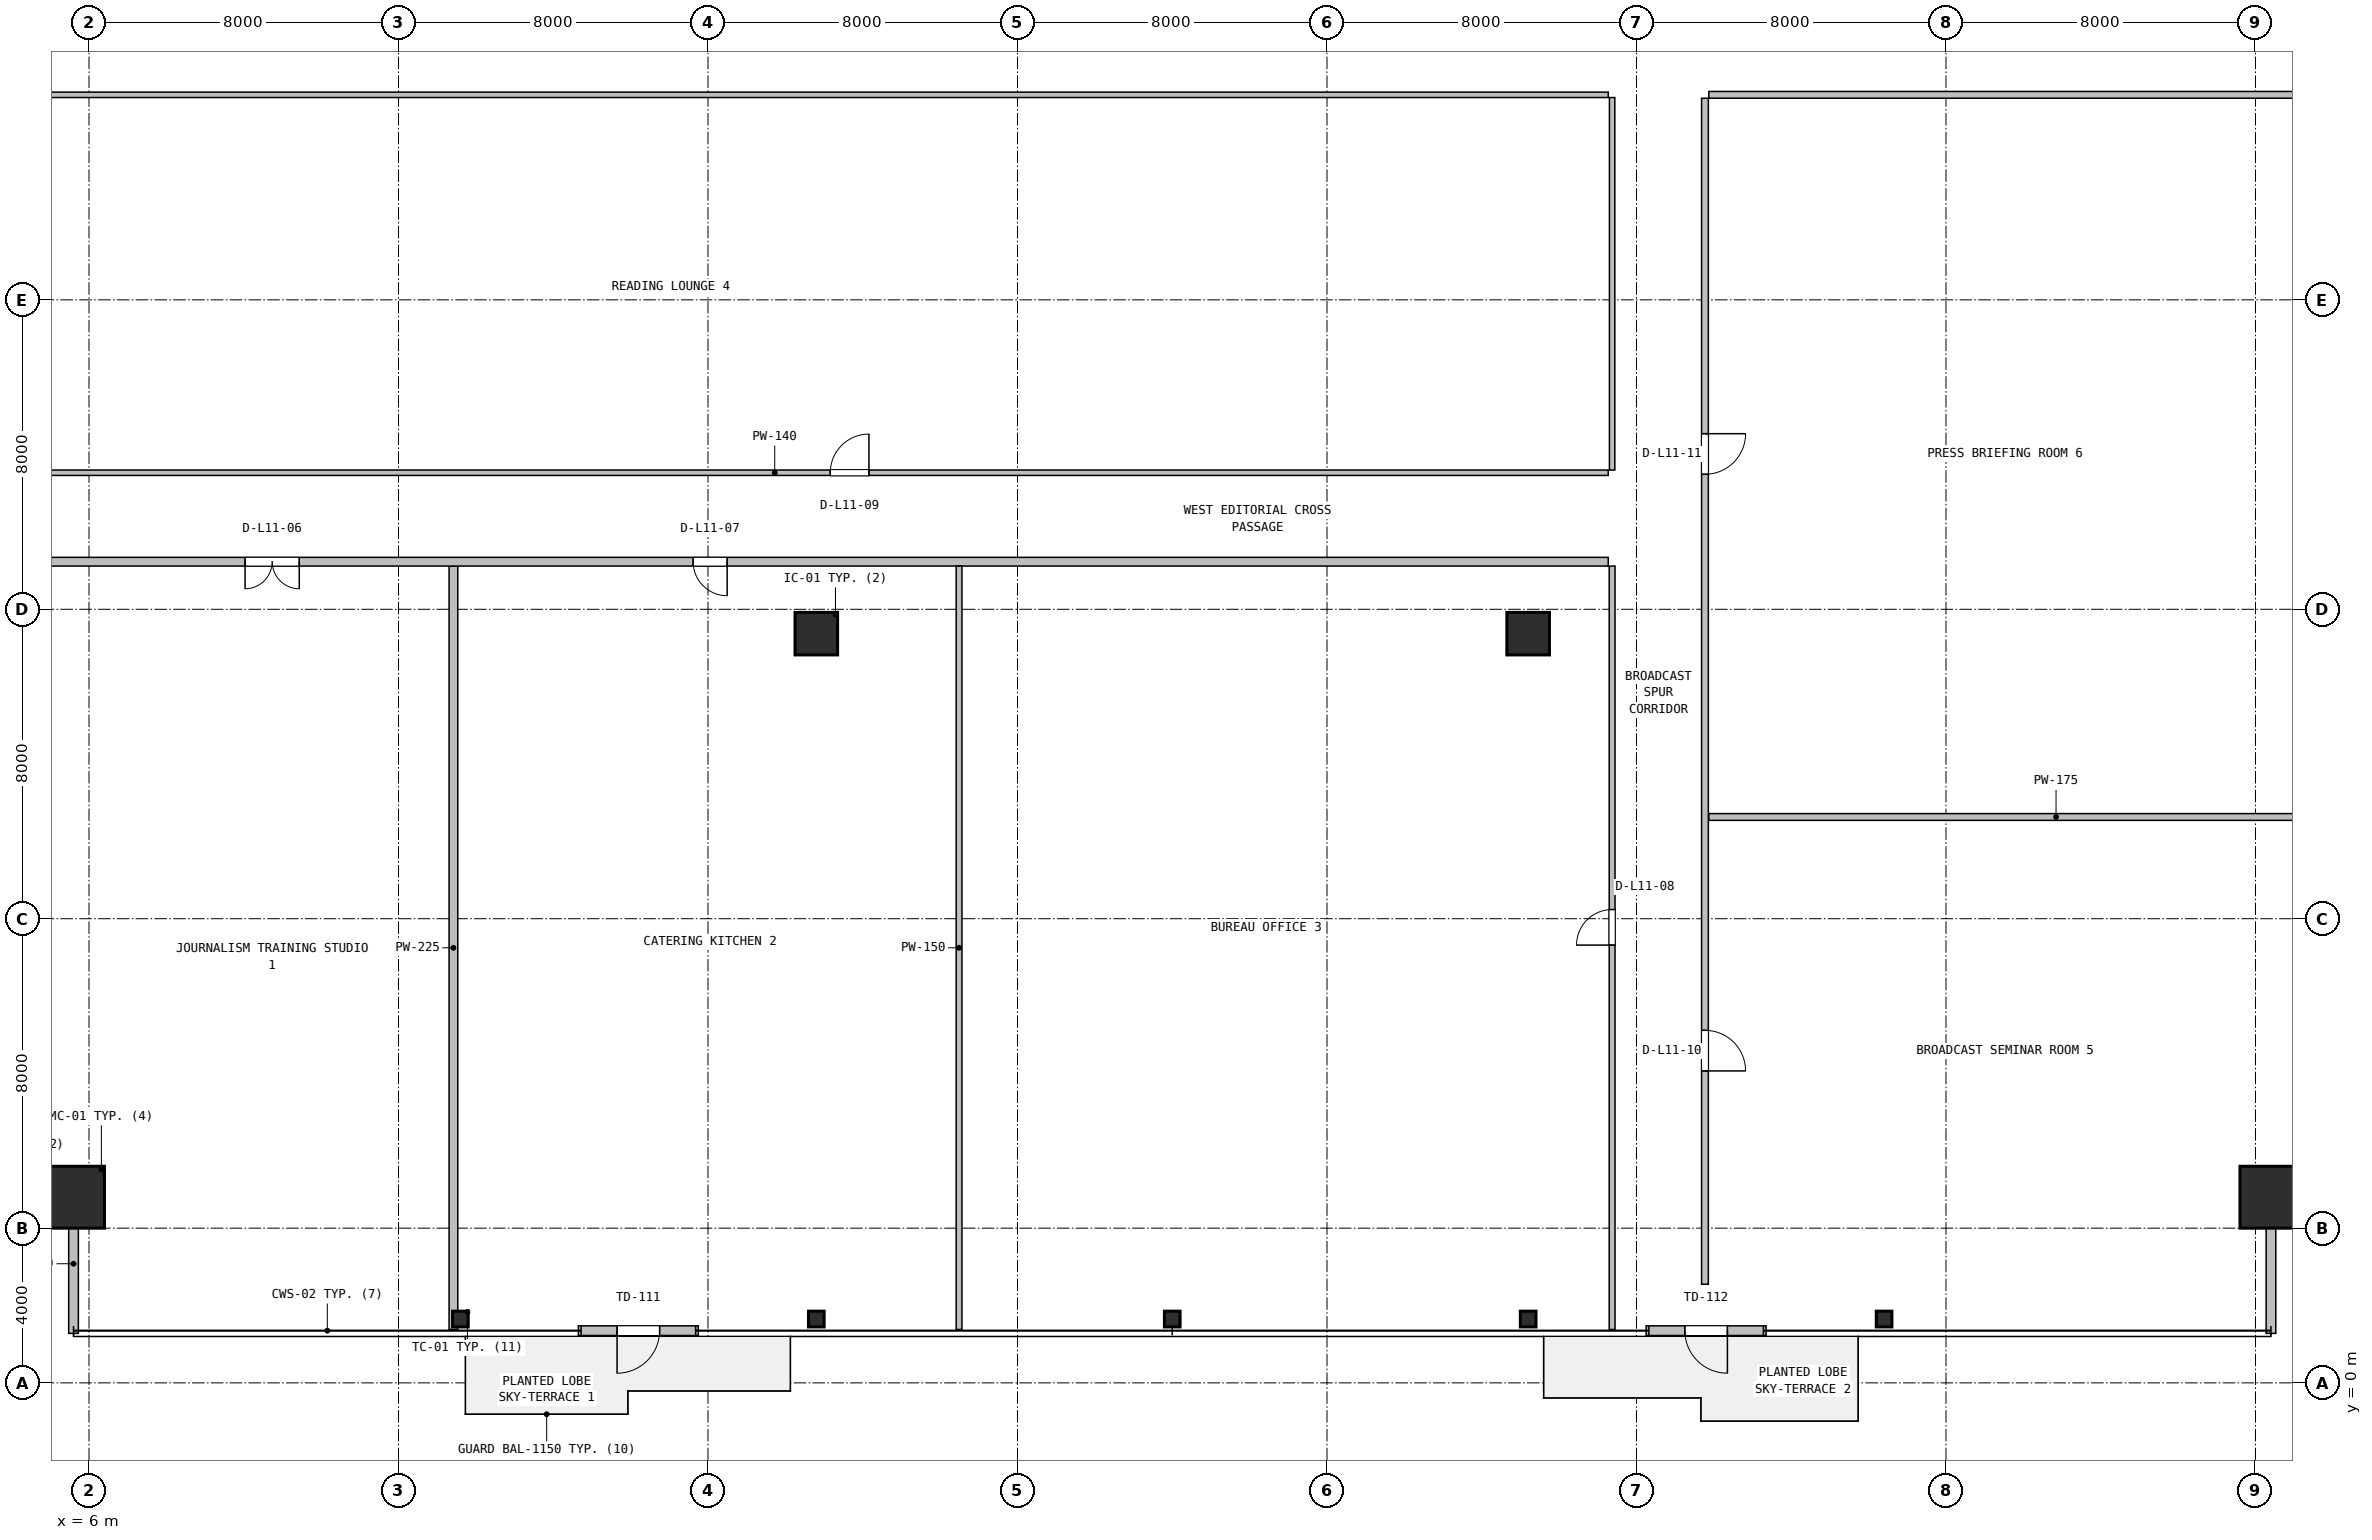
"""IFC4 building model, lengths in metres.
Left out: names, types, materials, properties, quantities, classifications, styles, units other than length and angle.
Written with IfcOpenShell. Run it as: python <this file> out.ifc"""

import sys

from ifc_helpers import new_model, si_unit, direction, frame, frame_2d, origin, origin_2d, place, context, subcontext, project, spatial, rectangle, hollow_rectangle, i_section, extrude, source, transform, mapped, element, fill, save


model = new_model("IFC4")
c1 = context("Model", 3, precision=1e-05, world=origin(), true_north=direction((0.0, 1.0)))
c2 = subcontext(c1, "Body", "Model", "MODEL_VIEW")
j1 = project(units=[si_unit("LENGTHUNIT", "METRE"), si_unit("PLANEANGLEUNIT", "RADIAN")], contexts=[c1])
p1 = place(None, origin())
s1 = spatial("IfcSite", under=j1, at=p1, CompositionType="ELEMENT")
p2 = place(p1, origin())
s2 = spatial("IfcBuilding", under=s1, at=p2, CompositionType="ELEMENT")
p3 = place(p2, frame((0.0, 0.0, 51.0)))
s3 = spatial("IfcBuildingStorey", under=s2, at=p3, CompositionType="ELEMENT", Elevation=51.0)
m1 = source(origin(), c2, "Body", "SweptSolid", [
    extrude(hollow_rectangle(XDim=1.6, YDim=1.6, WallThickness=0.06, at=origin_2d()), origin(), (0.0, 0.0, 1.0), 3.9),
])
for number, where, z_axis, x_axis in (
    (1, (5.6, 4.8, 0.0), (0.0, 0.0, 1.0), (1.0, 0.0, 0.0)),
    (2, (62.4, 4.8, 0.0), (0.0, 0.0, 1.0), (1.0, 0.0, 0.0)),
):
    element("IfcColumn", number, at=place(p3, frame(where, z_axis=z_axis, x_axis=x_axis)), inside=s3, PredefinedType="COLUMN", context=c2, shape_type="MappedRepresentation", body=[
        mapped(m1, transform((0.0, 0.0, 0.0), x_axis=(1.0, 0.0, 0.0), y_axis=(0.0, 1.0, 0.0), z_axis=(0.0, 0.0, 1.0), scale=1.0)),
    ])
m2 = source(origin(), c2, "Body", "SweptSolid", [
    extrude(i_section(OverallWidth=0.404, OverallDepth=0.407, WebThickness=0.027, FlangeThickness=0.044, FilletRadius=0.018, at=origin_2d()), origin(), (0.0, 0.0, 1.0), 3.9),
])
for number, where, z_axis, x_axis in (
    (3, (15.6, 1.65, 0.0), (0.0, 0.0, 1.0), (1.0, 0.0, 0.0)),
    (4, (24.8, 1.65, 0.0), (0.0, 0.0, 1.0), (1.0, 0.0, 0.0)),
    (5, (34.0, 1.65, 0.0), (0.0, 0.0, 1.0), (1.0, 0.0, 0.0)),
    (6, (43.2, 1.65, 0.0), (0.0, 0.0, 1.0), (1.0, 0.0, 0.0)),
    (7, (52.4, 1.65, 0.0), (0.0, 0.0, 1.0), (1.0, 0.0, 0.0)),
):
    element("IfcColumn", number, at=place(p3, frame(where, z_axis=z_axis, x_axis=x_axis)), inside=s3, PredefinedType="COLUMN", context=c2, shape_type="MappedRepresentation", body=[
        mapped(m2, transform((0.0, 0.0, 0.0), x_axis=(1.0, 0.0, 0.0), y_axis=(0.0, 1.0, 0.0), z_axis=(0.0, 0.0, 1.0), scale=1.0)),
    ])
m3 = source(origin(), c2, "Body", "SweptSolid", [
    extrude(rectangle(XDim=1.1, YDim=1.1, at=origin_2d()), origin(), (0.0, 0.0, 1.0), 3.9),
])
for number, where, z_axis, x_axis in (
    (8, (24.8, 19.37, 0.0), (0.0, 0.0, 1.0), (1.0, 0.0, 0.0)),
    (9, (43.2, 19.37, 0.0), (0.0, 0.0, 1.0), (1.0, 0.0, 0.0)),
):
    element("IfcColumn", number, at=place(p3, frame(where, z_axis=z_axis, x_axis=x_axis)), inside=s3, PredefinedType="COLUMN", context=c2, shape_type="MappedRepresentation", body=[
        mapped(m3, transform((0.0, 0.0, 0.0), x_axis=(1.0, 0.0, 0.0), y_axis=(0.0, 1.0, 0.0), z_axis=(0.0, 0.0, 1.0), scale=1.0)),
    ])
p4 = place(p3, frame((18.65, 1.35, 0.0), z_axis=(0.0, 0.0, 1.0), x_axis=(1.0, 0.0, 0.0)))
e10 = element("IfcWall", 10, at=p4, inside=s3, PredefinedType="SOLIDWALL", context=c2, shape_type="SweptSolid", body=[
    extrude(rectangle(XDim=3.1, YDim=0.25, at=frame_2d((1.55, 0.0))), origin(), (0.0, 0.0, 1.0), 3.63),
])
p5 = place(p4, frame((1.0, 0.0, 0.0)))
e11 = element("IfcOpeningElement", 11, at=p5, cuts=e10, PredefinedType="OPENING", context=c2, shape_type="SweptSolid", body=[
    extrude(rectangle(XDim=1.1, YDim=2.15, at=frame_2d((0.55, 1.075))), frame((0.0, 0.135, 0.0), z_axis=(0.0, -1.0, 0.0), x_axis=(1.0, 0.0, 0.0)), (0.0, 0.0, 1.0), 0.27),
])
p6 = place(p3, frame((46.25, 1.35, 0.0), z_axis=(0.0, 0.0, 1.0), x_axis=(1.0, 0.0, 0.0)))
e12 = element("IfcWall", 12, at=p6, inside=s3, PredefinedType="SOLIDWALL", context=c2, shape_type="SweptSolid", body=[
    extrude(rectangle(XDim=3.1, YDim=0.25, at=frame_2d((1.55, 0.0))), origin(), (0.0, 0.0, 1.0), 3.63),
])
p7 = place(p6, frame((1.0, 0.0, 0.0)))
e13 = element("IfcOpeningElement", 13, at=p7, cuts=e12, PredefinedType="OPENING", context=c2, shape_type="SweptSolid", body=[
    extrude(rectangle(XDim=1.1, YDim=2.15, at=frame_2d((0.55, 1.075))), frame((0.0, 0.135, 0.0), z_axis=(0.0, -1.0, 0.0), x_axis=(1.0, 0.0, 0.0)), (0.0, 0.0, 1.0), 0.27),
])
for number, where, z_axis, x_axis in (
    (14, (5.6, 1.28, 0.0), (0.0, 0.0, 1.0), (0.0, 1.0, 0.0)),
    (15, (62.4, 1.28, 0.0), (0.0, 0.0, 1.0), (0.0, 1.0, 0.0)),
):
    element("IfcWall", number, at=place(p3, frame(where, z_axis=z_axis, x_axis=x_axis)), inside=s3, PredefinedType="SOLIDWALL", context=c2, shape_type="SweptSolid", body=[
        extrude(rectangle(XDim=3.6, YDim=0.25, at=frame_2d((1.8, 0.0))), origin(), (0.0, 0.0, 1.0), 3.208),
    ])
p8 = place(p3, frame((15.42, 1.38, 0.0), z_axis=(0.0, 0.0, 1.0), x_axis=(0.0, 1.0, 0.0)))
e16 = element("IfcWall", 16, at=p8, inside=s3, PredefinedType="PARTITIONING", context=c2, shape_type="SweptSolid", body=[
    extrude(rectangle(XDim=19.737, YDim=0.225, at=frame_2d((9.869, 0.0))), origin(), (0.0, 0.0, 1.0), 3.208),
])
p9 = place(p3, frame((2.18, 21.23, 0.0), z_axis=(0.0, 0.0, 1.0), x_axis=(1.0, 0.0, 0.0)))
e17 = element("IfcWall", 17, at=p9, inside=s3, PredefinedType="PARTITIONING", context=c2, shape_type="SweptSolid", body=[
    extrude(rectangle(XDim=43.09, YDim=0.225, at=frame_2d((21.545, 0.0))), origin(), (0.0, 0.0, 1.0), 2.852),
])
p10 = place(p9, frame((7.855, 0.0, 0.0)))
e18 = element("IfcOpeningElement", 18, at=p10, cuts=e17, PredefinedType="OPENING", context=c2, shape_type="SweptSolid", body=[
    extrude(rectangle(XDim=1.4, YDim=2.12, at=frame_2d((0.7, 1.06))), frame((0.0, 0.123, 0.0), z_axis=(0.0, -1.0, 0.0), x_axis=(1.0, 0.0, 0.0)), (0.0, 0.0, 1.0), 0.245),
])
p11 = place(p9, frame((19.435, 0.0, 0.0)))
e19 = element("IfcOpeningElement", 19, at=p11, cuts=e17, PredefinedType="OPENING", context=c2, shape_type="SweptSolid", body=[
    extrude(rectangle(XDim=0.88, YDim=2.06, at=frame_2d((0.44, 1.03))), frame((0.0, 0.123, 0.0), z_axis=(0.0, -1.0, 0.0), x_axis=(1.0, 0.0, 0.0)), (0.0, 0.0, 1.0), 0.245),
])
p12 = place(p3, frame((28.49, 1.38, 0.0), z_axis=(0.0, 0.0, 1.0), x_axis=(0.0, 1.0, 0.0)))
e20 = element("IfcWall", 20, at=p12, inside=s3, PredefinedType="PARTITIONING", context=c2, shape_type="SweptSolid", body=[
    extrude(rectangle(XDim=19.737, YDim=0.15, at=frame_2d((9.869, 0.0))), origin(), (0.0, 0.0, 1.0), 2.852),
])
p13 = place(p3, frame((45.37, 1.38, 0.0), z_axis=(0.0, 0.0, 1.0), x_axis=(0.0, 1.0, 0.0)))
e21 = element("IfcWall", 21, at=p13, inside=s3, PredefinedType="PARTITIONING", context=c2, shape_type="SweptSolid", body=[
    extrude(rectangle(XDim=19.737, YDim=0.15, at=frame_2d((9.869, 0.0))), origin(), (0.0, 0.0, 1.0), 3.208),
])
p14 = place(p13, frame((9.938, 0.0, 0.0)))
e22 = element("IfcOpeningElement", 22, at=p14, cuts=e21, PredefinedType="OPENING", context=c2, shape_type="SweptSolid", body=[
    extrude(rectangle(XDim=0.92, YDim=2.08, at=frame_2d((0.46, 1.04))), frame((0.0, 0.085, 0.0), z_axis=(0.0, -1.0, 0.0), x_axis=(1.0, 0.0, 0.0)), (0.0, 0.0, 1.0), 0.17),
])
p15 = place(p3, frame((2.18, 23.53, 0.0), z_axis=(0.0, 0.0, 1.0), x_axis=(1.0, 0.0, 0.0)))
e23 = element("IfcWall", 23, at=p15, inside=s3, PredefinedType="PARTITIONING", context=c2, shape_type="SweptSolid", body=[
    extrude(rectangle(XDim=43.09, YDim=0.14, at=frame_2d((21.545, 0.0))), origin(), (0.0, 0.0, 1.0), 2.852),
])
p16 = place(p15, frame((22.98, 0.0, 0.0)))
e24 = element("IfcOpeningElement", 24, at=p16, cuts=e23, PredefinedType="OPENING", context=c2, shape_type="SweptSolid", body=[
    extrude(rectangle(XDim=1.0, YDim=2.1, at=frame_2d((0.5, 1.05))), frame((0.0, 0.08, 0.0), z_axis=(0.0, -1.0, 0.0), x_axis=(1.0, 0.0, 0.0)), (0.0, 0.0, 1.0), 0.16),
])
p17 = place(p3, frame((45.37, 23.6, 0.0), z_axis=(0.0, 0.0, 1.0), x_axis=(0.0, 1.0, 0.0)))
e25 = element("IfcWall", 25, at=p17, inside=s3, PredefinedType="PARTITIONING", context=c2, shape_type="SweptSolid", body=[
    extrude(rectangle(XDim=9.63, YDim=0.14, at=frame_2d((4.815, 0.0))), origin(), (0.0, 0.0, 1.0), 3.378),
])
p18 = place(p3, frame((2.18, 33.3, 0.0), z_axis=(0.0, 0.0, 1.0), x_axis=(1.0, 0.0, 0.0)))
e26 = element("IfcWall", 26, at=p18, inside=s3, PredefinedType="PARTITIONING", context=c2, shape_type="SweptSolid", body=[
    extrude(rectangle(XDim=43.09, YDim=0.14, at=frame_2d((21.545, 0.0))), origin(), (0.0, 0.0, 1.0), 2.852),
])
p19 = place(p3, frame((47.87, 14.63, 0.0), z_axis=(0.0, 0.0, 1.0), x_axis=(1.0, 0.0, 0.0)))
e27 = element("IfcWall", 27, at=p19, inside=s3, PredefinedType="PARTITIONING", context=c2, shape_type="SweptSolid", body=[
    extrude(rectangle(XDim=17.95, YDim=0.175, at=frame_2d((8.975, 0.0))), origin(), (0.0, 0.0, 1.0), 3.208),
])
p20 = place(p3, frame((47.77, 2.55, 0.0), z_axis=(0.0, 0.0, 1.0), x_axis=(0.0, 1.0, 0.0)))
e28 = element("IfcWall", 28, at=p20, inside=s3, PredefinedType="PARTITIONING", context=c2, shape_type="SweptSolid", body=[
    extrude(rectangle(XDim=30.662, YDim=0.175, at=frame_2d((15.331, 0.0))), origin(), (0.0, 0.0, 1.0), 3.322),
])
p21 = place(p20, frame((5.515, 0.0, 0.0)))
e29 = element("IfcOpeningElement", 29, at=p21, cuts=e28, PredefinedType="OPENING", context=c2, shape_type="SweptSolid", body=[
    extrude(rectangle(XDim=1.05, YDim=2.1, at=frame_2d((0.525, 1.05))), frame((0.0, 0.098, 0.0), z_axis=(0.0, -1.0, 0.0), x_axis=(1.0, 0.0, 0.0)), (0.0, 0.0, 1.0), 0.195),
])
p22 = place(p20, frame((20.94, 0.0, 0.0)))
e30 = element("IfcOpeningElement", 30, at=p22, cuts=e28, PredefinedType="OPENING", context=c2, shape_type="SweptSolid", body=[
    extrude(rectangle(XDim=1.05, YDim=2.1, at=frame_2d((0.525, 1.05))), frame((0.0, 0.098, 0.0), z_axis=(0.0, -1.0, 0.0), x_axis=(1.0, 0.0, 0.0)), (0.0, 0.0, 1.0), 0.195),
])
p23 = place(p3, frame((47.87, 33.3, 0.0), z_axis=(0.0, 0.0, 1.0), x_axis=(1.0, 0.0, 0.0)))
e31 = element("IfcWall", 31, at=p23, inside=s3, PredefinedType="PARTITIONING", context=c2, shape_type="SweptSolid", body=[
    extrude(rectangle(XDim=17.95, YDim=0.175, at=frame_2d((8.975, 0.0))), origin(), (0.0, 0.0, 1.0), 3.208),
])
m4 = source(origin(), c2, "Body", "SweptSolid", [
    extrude(rectangle(XDim=1.1, YDim=2.15, at=frame_2d((0.55, 1.075))), frame((0.0, 0.025, 0.0), z_axis=(0.0, -1.0, 0.0), x_axis=(1.0, 0.0, 0.0)), (0.0, 0.0, 1.0), 0.05),
])
p24 = place(p5, frame((1.1, 0.0, 0.0), z_axis=(0.0, 0.0, 1.0), x_axis=(-1.0, 0.0, 0.0)))
e32 = element("IfcDoor", 32, at=p24, inside=s3, OperationType="SINGLE_SWING_LEFT", PredefinedType="DOOR", context=c2, shape_type="MappedRepresentation", body=[
    mapped(m4, transform((0.0, 0.0, 0.0), x_axis=(1.0, 0.0, 0.0), y_axis=(0.0, 1.0, 0.0), z_axis=(0.0, 0.0, 1.0), scale=1.0)),
])
fill(e11, e32)
p25 = place(p7, frame((1.1, 0.0, 0.0), z_axis=(0.0, 0.0, 1.0), x_axis=(-1.0, 0.0, 0.0)))
e33 = element("IfcDoor", 33, at=p25, inside=s3, OperationType="SINGLE_SWING_RIGHT", PredefinedType="DOOR", context=c2, shape_type="MappedRepresentation", body=[
    mapped(m4, transform((0.0, 0.0, 0.0), x_axis=(1.0, 0.0, 0.0), y_axis=(0.0, 1.0, 0.0), z_axis=(0.0, 0.0, 1.0), scale=1.0)),
])
fill(e13, e33)
m5 = source(origin(), c2, "Body", "SweptSolid", [
    extrude(rectangle(XDim=1.4, YDim=2.12, at=frame_2d((0.7, 1.06))), frame((0.0, 0.025, 0.0), z_axis=(0.0, -1.0, 0.0), x_axis=(1.0, 0.0, 0.0)), (0.0, 0.0, 1.0), 0.05),
])
p26 = place(p10, frame((1.4, 0.0, 0.0), z_axis=(0.0, 0.0, 1.0), x_axis=(-1.0, 0.0, 0.0)))
e34 = element("IfcDoor", 34, at=p26, inside=s3, OperationType="DOUBLE_DOOR_SINGLE_SWING", PredefinedType="DOOR", context=c2, shape_type="MappedRepresentation", body=[
    mapped(m5, transform((0.0, 0.0, 0.0), x_axis=(1.0, 0.0, 0.0), y_axis=(0.0, 1.0, 0.0), z_axis=(0.0, 0.0, 1.0), scale=1.0)),
])
fill(e18, e34)
m6 = source(origin(), c2, "Body", "SweptSolid", [
    extrude(rectangle(XDim=0.88, YDim=2.06, at=frame_2d((0.44, 1.03))), frame((0.0, 0.025, 0.0), z_axis=(0.0, -1.0, 0.0), x_axis=(1.0, 0.0, 0.0)), (0.0, 0.0, 1.0), 0.05),
])
p27 = place(p11, frame((0.88, 0.0, 0.0), z_axis=(0.0, 0.0, 1.0), x_axis=(-1.0, 0.0, 0.0)))
e35 = element("IfcDoor", 35, at=p27, inside=s3, OperationType="SINGLE_SWING_RIGHT", PredefinedType="DOOR", context=c2, shape_type="MappedRepresentation", body=[
    mapped(m6, transform((0.0, 0.0, 0.0), x_axis=(1.0, 0.0, 0.0), y_axis=(0.0, 1.0, 0.0), z_axis=(0.0, 0.0, 1.0), scale=1.0)),
])
fill(e19, e35)
m7 = source(origin(), c2, "Body", "SweptSolid", [
    extrude(rectangle(XDim=0.92, YDim=2.08, at=frame_2d((0.46, 1.04))), frame((0.0, 0.025, 0.0), z_axis=(0.0, -1.0, 0.0), x_axis=(1.0, 0.0, 0.0)), (0.0, 0.0, 1.0), 0.05),
])
p28 = place(p14, origin())
e36 = element("IfcDoor", 36, at=p28, inside=s3, OperationType="SINGLE_SWING_LEFT", PredefinedType="DOOR", context=c2, shape_type="MappedRepresentation", body=[
    mapped(m7, transform((0.0, 0.0, 0.0), x_axis=(1.0, 0.0, 0.0), y_axis=(0.0, 1.0, 0.0), z_axis=(0.0, 0.0, 1.0), scale=1.0)),
])
fill(e22, e36)
m8 = source(origin(), c2, "Body", "SweptSolid", [
    extrude(rectangle(XDim=1.0, YDim=2.1, at=frame_2d((0.5, 1.05))), frame((0.0, 0.025, 0.0), z_axis=(0.0, -1.0, 0.0), x_axis=(1.0, 0.0, 0.0)), (0.0, 0.0, 1.0), 0.05),
])
p29 = place(p16, origin())
e37 = element("IfcDoor", 37, at=p29, inside=s3, OperationType="SINGLE_SWING_RIGHT", PredefinedType="DOOR", context=c2, shape_type="MappedRepresentation", body=[
    mapped(m8, transform((0.0, 0.0, 0.0), x_axis=(1.0, 0.0, 0.0), y_axis=(0.0, 1.0, 0.0), z_axis=(0.0, 0.0, 1.0), scale=1.0)),
])
fill(e24, e37)
m9 = source(origin(), c2, "Body", "SweptSolid", [
    extrude(rectangle(XDim=1.05, YDim=2.1, at=frame_2d((0.525, 1.05))), frame((0.0, 0.025, 0.0), z_axis=(0.0, -1.0, 0.0), x_axis=(1.0, 0.0, 0.0)), (0.0, 0.0, 1.0), 0.05),
])
p30 = place(p21, frame((1.05, 0.0, 0.0), z_axis=(0.0, 0.0, 1.0), x_axis=(-1.0, 0.0, 0.0)))
e38 = element("IfcDoor", 38, at=p30, inside=s3, OperationType="SINGLE_SWING_LEFT", PredefinedType="DOOR", context=c2, shape_type="MappedRepresentation", body=[
    mapped(m9, transform((0.0, 0.0, 0.0), x_axis=(1.0, 0.0, 0.0), y_axis=(0.0, 1.0, 0.0), z_axis=(0.0, 0.0, 1.0), scale=1.0)),
])
fill(e29, e38)
p31 = place(p22, frame((1.05, 0.0, 0.0), z_axis=(0.0, 0.0, 1.0), x_axis=(-1.0, 0.0, 0.0)))
e39 = element("IfcDoor", 39, at=p31, inside=s3, OperationType="SINGLE_SWING_RIGHT", PredefinedType="DOOR", context=c2, shape_type="MappedRepresentation", body=[
    mapped(m9, transform((0.0, 0.0, 0.0), x_axis=(1.0, 0.0, 0.0), y_axis=(0.0, 1.0, 0.0), z_axis=(0.0, 0.0, 1.0), scale=1.0)),
])
fill(e30, e39)
save(model, sys.argv[1])
